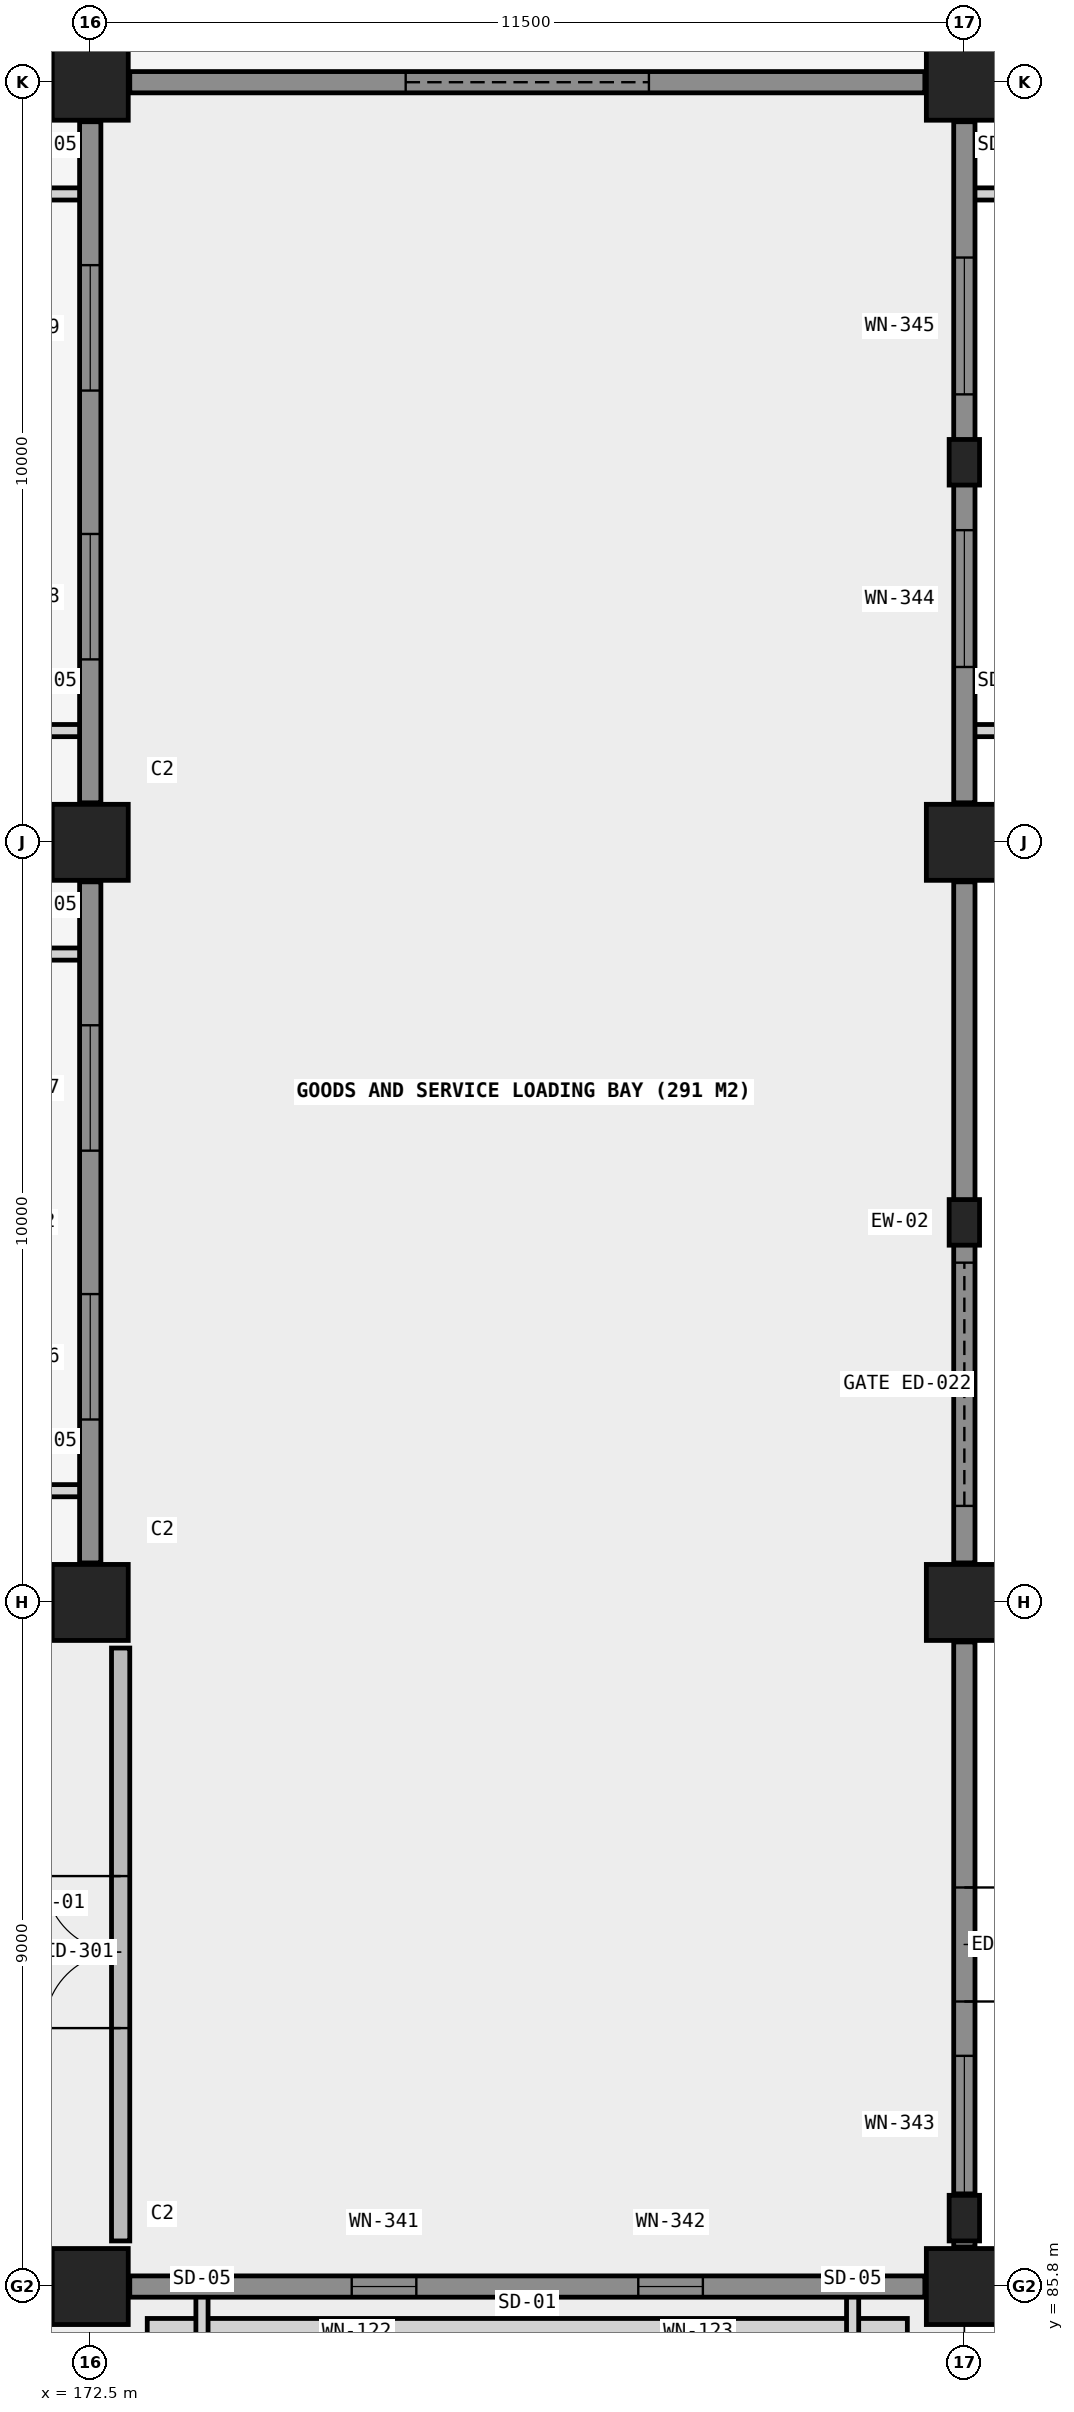
"""IFC4 building model, lengths in metres.
Left out: names, types, materials, properties, quantities, classifications, styles, units other than length and angle.
Written with IfcOpenShell. Run it as: python <this file> out.ifc"""

import sys

from ifc_helpers import new_model, si_unit, direction, frame, frame_2d, origin, origin_2d, place, context, subcontext, project, spatial, rectangle, extrude, element, fill, save


model = new_model("IFC4")
c1 = context("Model", 3, precision=1e-05, world=origin(), true_north=direction((0.0, 1.0)))
c2 = subcontext(c1, "Body", "Model", "MODEL_VIEW")
j1 = project(units=[si_unit("LENGTHUNIT", "METRE"), si_unit("PLANEANGLEUNIT", "RADIAN")], contexts=[c1])
p1 = place(None, origin())
s1 = spatial("IfcSite", under=j1, at=p1, CompositionType="ELEMENT")
p2 = place(p1, origin())
s2 = spatial("IfcBuilding", under=s1, at=p2, CompositionType="ELEMENT")
p3 = place(p2, origin())
s3 = spatial("IfcBuildingStorey", under=s2, at=p3, CompositionType="ELEMENT", Elevation=0.0)
for number, where, z_axis, x_axis in (
    (1, (172.5, 85.8, 0.0), (0.0, 0.0, 1.0), (1.0, 0.0, 0.0)),
    (2, (172.5, 94.8, 0.0), (0.0, 0.0, 1.0), (1.0, 0.0, 0.0)),
    (3, (172.5, 104.8, 0.0), (0.0, 0.0, 1.0), (1.0, 0.0, 0.0)),
    (4, (172.5, 114.8, 0.0), (0.0, 0.0, 1.0), (1.0, 0.0, 0.0)),
    (5, (184.0, 85.8, 0.0), (0.0, 0.0, 1.0), (1.0, 0.0, 0.0)),
    (6, (184.0, 94.8, 0.0), (0.0, 0.0, 1.0), (1.0, 0.0, 0.0)),
    (7, (184.0, 104.8, 0.0), (0.0, 0.0, 1.0), (1.0, 0.0, 0.0)),
    (8, (184.0, 114.8, 0.0), (0.0, 0.0, 1.0), (1.0, 0.0, 0.0)),
):
    element("IfcColumn", number, at=place(p3, frame(where, z_axis=z_axis, x_axis=x_axis)), inside=s3, PredefinedType="COLUMN", context=c2, shape_type="SweptSolid", body=[
        extrude(rectangle(XDim=1.0, YDim=1.0, at=origin_2d()), origin(), (0.0, 0.0, 1.0), 4.2),
    ])
for number, where, z_axis, x_axis in (
    (9, (184.0, 86.7, 0.0), (0.0, 0.0, 1.0), (1.0, 0.0, 0.0)),
    (10, (184.0, 99.8, 0.0), (0.0, 0.0, 1.0), (1.0, 0.0, 0.0)),
    (11, (184.0, 109.8, 0.0), (0.0, 0.0, 1.0), (1.0, 0.0, 0.0)),
):
    element("IfcColumn", number, at=place(p3, frame(where, z_axis=z_axis, x_axis=x_axis)), inside=s3, PredefinedType="PILASTER", context=c2, shape_type="SweptSolid", body=[
        extrude(rectangle(XDim=0.4, YDim=0.6, at=origin_2d()), origin(), (0.0, 0.0, 1.0), 4.2),
    ])
p4 = place(p3, frame((173.02, 85.8, 0.0), z_axis=(0.0, 0.0, 1.0), x_axis=(1.0, 0.0, 0.0)))
e12 = element("IfcWall", 12, at=p4, inside=s3, PredefinedType="SOLIDWALL", context=c2, shape_type="SweptSolid", body=[
    extrude(rectangle(XDim=10.46, YDim=0.28, at=frame_2d((5.23, 0.0))), origin(), (0.0, 0.0, 1.0), 3.15),
])
p5 = place(p4, frame((2.92, 0.0, 1.25)))
e13 = element("IfcOpeningElement", 13, at=p5, cuts=e12, PredefinedType="OPENING", context=c2, shape_type="SweptSolid", body=[
    extrude(rectangle(XDim=0.85, YDim=0.95, at=frame_2d((0.425, 0.475))), frame((0.0, 0.15, 0.0), z_axis=(0.0, -1.0, 0.0), x_axis=(1.0, 0.0, 0.0)), (0.0, 0.0, 1.0), 0.3),
])
p6 = place(p4, frame((6.69, 0.0, 1.25)))
e14 = element("IfcOpeningElement", 14, at=p6, cuts=e12, PredefinedType="OPENING", context=c2, shape_type="SweptSolid", body=[
    extrude(rectangle(XDim=0.85, YDim=0.95, at=frame_2d((0.425, 0.475))), frame((0.0, 0.15, 0.0), z_axis=(0.0, -1.0, 0.0), x_axis=(1.0, 0.0, 0.0)), (0.0, 0.0, 1.0), 0.3),
])
p7 = place(p3, frame((184.0, 86.32, 0.0), z_axis=(0.0, 0.0, 1.0), x_axis=(0.0, 1.0, 0.0)))
e15 = element("IfcWall", 15, at=p7, inside=s3, PredefinedType="SOLIDWALL", context=c2, shape_type="SweptSolid", body=[
    extrude(rectangle(XDim=7.96, YDim=0.28, at=frame_2d((3.98, 0.0))), origin(), (0.0, 0.0, 1.0), 3.25),
])
p8 = place(p7, frame((3.23, 0.0, 0.0)))
e16 = element("IfcOpeningElement", 16, at=p8, cuts=e15, PredefinedType="OPENING", context=c2, shape_type="SweptSolid", body=[
    extrude(rectangle(XDim=1.5, YDim=2.3, at=frame_2d((0.75, 1.15))), frame((0.0, 0.15, 0.0), z_axis=(0.0, -1.0, 0.0), x_axis=(1.0, 0.0, 0.0)), (0.0, 0.0, 1.0), 0.3),
])
p9 = place(p7, frame((0.715, 0.0, 0.78)))
e17 = element("IfcOpeningElement", 17, at=p9, cuts=e15, PredefinedType="OPENING", context=c2, shape_type="SweptSolid", body=[
    extrude(rectangle(XDim=1.8, YDim=1.3, at=frame_2d((0.9, 0.65))), frame((0.0, 0.15, 0.0), z_axis=(0.0, -1.0, 0.0), x_axis=(1.0, 0.0, 0.0)), (0.0, 0.0, 1.0), 0.3),
])
p10 = place(p3, frame((184.0, 95.32, 0.0), z_axis=(0.0, 0.0, 1.0), x_axis=(0.0, 1.0, 0.0)))
e18 = element("IfcWall", 18, at=p10, inside=s3, PredefinedType="SOLIDWALL", context=c2, shape_type="SweptSolid", body=[
    extrude(rectangle(XDim=8.96, YDim=0.28, at=frame_2d((4.48, 0.0))), origin(), (0.0, 0.0, 1.0), 3.25),
])
p11 = place(p10, frame((0.75, 0.0, 0.0)))
e19 = element("IfcOpeningElement", 19, at=p11, cuts=e18, PredefinedType="OPENING", context=c2, shape_type="SweptSolid", body=[
    extrude(rectangle(XDim=3.2, YDim=3.05, at=frame_2d((1.6, 1.525))), frame((0.0, 0.15, 0.0), z_axis=(0.0, -1.0, 0.0), x_axis=(1.0, 0.0, 0.0)), (0.0, 0.0, 1.0), 0.3),
])
p12 = place(p3, frame((184.0, 105.32, 0.0), z_axis=(0.0, 0.0, 1.0), x_axis=(0.0, 1.0, 0.0)))
e20 = element("IfcWall", 20, at=p12, inside=s3, PredefinedType="SOLIDWALL", context=c2, shape_type="SweptSolid", body=[
    extrude(rectangle(XDim=8.96, YDim=0.28, at=frame_2d((4.48, 0.0))), origin(), (0.0, 0.0, 1.0), 3.25),
])
p13 = place(p12, frame((1.787, 0.0, 1.25)))
e21 = element("IfcOpeningElement", 21, at=p13, cuts=e20, PredefinedType="OPENING", context=c2, shape_type="SweptSolid", body=[
    extrude(rectangle(XDim=1.8, YDim=1.3, at=frame_2d((0.9, 0.65))), frame((0.0, 0.15, 0.0), z_axis=(0.0, -1.0, 0.0), x_axis=(1.0, 0.0, 0.0)), (0.0, 0.0, 1.0), 0.3),
])
p14 = place(p12, frame((5.373, 0.0, 1.25)))
e22 = element("IfcOpeningElement", 22, at=p14, cuts=e20, PredefinedType="OPENING", context=c2, shape_type="SweptSolid", body=[
    extrude(rectangle(XDim=1.8, YDim=1.3, at=frame_2d((0.9, 0.65))), frame((0.0, 0.15, 0.0), z_axis=(0.0, -1.0, 0.0), x_axis=(1.0, 0.0, 0.0)), (0.0, 0.0, 1.0), 0.3),
])
p15 = place(p3, frame((173.02, 114.8, 0.0), z_axis=(0.0, 0.0, 1.0), x_axis=(1.0, 0.0, 0.0)))
e23 = element("IfcWall", 23, at=p15, inside=s3, PredefinedType="SOLIDWALL", context=c2, shape_type="SweptSolid", body=[
    extrude(rectangle(XDim=10.46, YDim=0.28, at=frame_2d((5.23, 0.0))), origin(), (0.0, 0.0, 1.0), 3.15),
])
p16 = place(p15, frame((3.63, 0.0, 0.0)))
e24 = element("IfcOpeningElement", 24, at=p16, cuts=e23, PredefinedType="OPENING", context=c2, shape_type="SweptSolid", body=[
    extrude(rectangle(XDim=3.2, YDim=3.05, at=frame_2d((1.6, 1.525))), frame((0.0, 0.15, 0.0), z_axis=(0.0, -1.0, 0.0), x_axis=(1.0, 0.0, 0.0)), (0.0, 0.0, 1.0), 0.3),
])
p17 = place(p3, frame((172.5, 95.32, 0.0), z_axis=(0.0, 0.0, 1.0), x_axis=(0.0, 1.0, 0.0)))
e25 = element("IfcWall", 25, at=p17, inside=s3, PredefinedType="SOLIDWALL", context=c2, shape_type="SweptSolid", body=[
    extrude(rectangle(XDim=8.96, YDim=0.28, at=frame_2d((4.48, 0.0))), origin(), (0.0, 0.0, 1.0), 3.15),
])
p18 = place(p17, frame((1.887, 0.0, 0.85)))
e26 = element("IfcOpeningElement", 26, at=p18, cuts=e25, PredefinedType="OPENING", context=c2, shape_type="SweptSolid", body=[
    extrude(rectangle(XDim=1.65, YDim=1.9, at=frame_2d((0.825, 0.95))), frame((0.0, 0.15, 0.0), z_axis=(0.0, -1.0, 0.0), x_axis=(1.0, 0.0, 0.0)), (0.0, 0.0, 1.0), 0.3),
])
p19 = place(p17, frame((5.423, 0.0, 0.85)))
e27 = element("IfcOpeningElement", 27, at=p19, cuts=e25, PredefinedType="OPENING", context=c2, shape_type="SweptSolid", body=[
    extrude(rectangle(XDim=1.65, YDim=1.9, at=frame_2d((0.825, 0.95))), frame((0.0, 0.15, 0.0), z_axis=(0.0, -1.0, 0.0), x_axis=(1.0, 0.0, 0.0)), (0.0, 0.0, 1.0), 0.3),
])
p20 = place(p3, frame((172.5, 105.32, 0.0), z_axis=(0.0, 0.0, 1.0), x_axis=(0.0, 1.0, 0.0)))
e28 = element("IfcWall", 28, at=p20, inside=s3, PredefinedType="SOLIDWALL", context=c2, shape_type="SweptSolid", body=[
    extrude(rectangle(XDim=8.96, YDim=0.28, at=frame_2d((4.48, 0.0))), origin(), (0.0, 0.0, 1.0), 3.15),
])
p21 = place(p20, frame((1.887, 0.0, 0.85)))
e29 = element("IfcOpeningElement", 29, at=p21, cuts=e28, PredefinedType="OPENING", context=c2, shape_type="SweptSolid", body=[
    extrude(rectangle(XDim=1.65, YDim=1.9, at=frame_2d((0.825, 0.95))), frame((0.0, 0.15, 0.0), z_axis=(0.0, -1.0, 0.0), x_axis=(1.0, 0.0, 0.0)), (0.0, 0.0, 1.0), 0.3),
])
p22 = place(p20, frame((5.423, 0.0, 0.85)))
e30 = element("IfcOpeningElement", 30, at=p22, cuts=e28, PredefinedType="OPENING", context=c2, shape_type="SweptSolid", body=[
    extrude(rectangle(XDim=1.65, YDim=1.9, at=frame_2d((0.825, 0.95))), frame((0.0, 0.15, 0.0), z_axis=(0.0, -1.0, 0.0), x_axis=(1.0, 0.0, 0.0)), (0.0, 0.0, 1.0), 0.3),
])
p23 = place(p3, frame((172.9, 86.4, 0.0), z_axis=(0.0, 0.0, 1.0), x_axis=(0.0, 1.0, 0.0)))
e31 = element("IfcWall", 31, at=p23, inside=s3, PredefinedType="SOLIDWALL", context=c2, shape_type="SweptSolid", body=[
    extrude(rectangle(XDim=7.8, YDim=0.24, at=frame_2d((3.9, 0.0))), origin(), (0.0, 0.0, 1.0), 3.88),
])
p24 = place(p23, frame((2.8, 0.0, 0.0)))
e32 = element("IfcOpeningElement", 32, at=p24, cuts=e31, PredefinedType="OPENING", context=c2, shape_type="SweptSolid", body=[
    extrude(rectangle(XDim=2.0, YDim=2.3, at=frame_2d((1.0, 1.15))), frame((0.0, 0.13, 0.0), z_axis=(0.0, -1.0, 0.0), x_axis=(1.0, 0.0, 0.0)), (0.0, 0.0, 1.0), 0.26),
])
p25 = place(p5, origin())
e33 = element("IfcWindow", 33, at=p25, inside=s3, PartitioningType="SINGLE_PANEL", PredefinedType="WINDOW", context=c2, shape_type="SweptSolid", body=[
    extrude(rectangle(XDim=0.85, YDim=0.95, at=frame_2d((0.425, 0.475))), frame((0.0, 0.03, 0.0), z_axis=(0.0, -1.0, 0.0), x_axis=(1.0, 0.0, 0.0)), (0.0, 0.0, 1.0), 0.06),
])
fill(e13, e33)
p26 = place(p6, origin())
e34 = element("IfcWindow", 34, at=p26, inside=s3, PartitioningType="SINGLE_PANEL", PredefinedType="WINDOW", context=c2, shape_type="SweptSolid", body=[
    extrude(rectangle(XDim=0.85, YDim=0.95, at=frame_2d((0.425, 0.475))), frame((0.0, 0.03, 0.0), z_axis=(0.0, -1.0, 0.0), x_axis=(1.0, 0.0, 0.0)), (0.0, 0.0, 1.0), 0.06),
])
fill(e14, e34)
p27 = place(p8, frame((0.75, 0.0, 0.0), z_axis=(0.0, 0.0, 1.0), x_axis=(-1.0, 0.0, 0.0)))
e35 = element("IfcDoor", 35, at=p27, inside=s3, OperationType="DOUBLE_DOOR_SINGLE_SWING", PredefinedType="DOOR", context=c2, shape_type="SweptSolid", body=[
    extrude(rectangle(XDim=1.5, YDim=2.3, at=frame_2d((0.0, 1.15))), frame((0.0, 0.025, 0.0), z_axis=(0.0, -1.0, 0.0), x_axis=(1.0, 0.0, 0.0)), (0.0, 0.0, 1.0), 0.05),
])
fill(e16, e35)
p28 = place(p9, origin())
e36 = element("IfcWindow", 36, at=p28, inside=s3, PartitioningType="SINGLE_PANEL", PredefinedType="WINDOW", context=c2, shape_type="SweptSolid", body=[
    extrude(rectangle(XDim=1.8, YDim=1.3, at=frame_2d((0.9, 0.65))), frame((0.0, 0.03, 0.0), z_axis=(0.0, -1.0, 0.0), x_axis=(1.0, 0.0, 0.0)), (0.0, 0.0, 1.0), 0.06),
])
fill(e17, e36)
p29 = place(p11, origin())
e37 = element("IfcDoor", 37, at=p29, inside=s3, OperationType="ROLLINGUP", PredefinedType="GATE", context=c2, shape_type="SweptSolid", body=[
    extrude(rectangle(XDim=3.2, YDim=3.05, at=frame_2d((1.6, 1.525))), frame((0.0, 0.025, 0.0), z_axis=(0.0, -1.0, 0.0), x_axis=(1.0, 0.0, 0.0)), (0.0, 0.0, 1.0), 0.05),
])
fill(e19, e37)
p30 = place(p13, origin())
e38 = element("IfcWindow", 38, at=p30, inside=s3, PartitioningType="SINGLE_PANEL", PredefinedType="WINDOW", context=c2, shape_type="SweptSolid", body=[
    extrude(rectangle(XDim=1.8, YDim=1.3, at=frame_2d((0.9, 0.65))), frame((0.0, 0.03, 0.0), z_axis=(0.0, -1.0, 0.0), x_axis=(1.0, 0.0, 0.0)), (0.0, 0.0, 1.0), 0.06),
])
fill(e21, e38)
p31 = place(p14, origin())
e39 = element("IfcWindow", 39, at=p31, inside=s3, PartitioningType="SINGLE_PANEL", PredefinedType="WINDOW", context=c2, shape_type="SweptSolid", body=[
    extrude(rectangle(XDim=1.8, YDim=1.3, at=frame_2d((0.9, 0.65))), frame((0.0, 0.03, 0.0), z_axis=(0.0, -1.0, 0.0), x_axis=(1.0, 0.0, 0.0)), (0.0, 0.0, 1.0), 0.06),
])
fill(e22, e39)
p32 = place(p16, origin())
e40 = element("IfcDoor", 40, at=p32, inside=s3, OperationType="ROLLINGUP", PredefinedType="GATE", context=c2, shape_type="SweptSolid", body=[
    extrude(rectangle(XDim=3.2, YDim=3.05, at=frame_2d((1.6, 1.525))), frame((0.0, 0.025, 0.0), z_axis=(0.0, -1.0, 0.0), x_axis=(1.0, 0.0, 0.0)), (0.0, 0.0, 1.0), 0.05),
])
fill(e24, e40)
p33 = place(p18, origin())
e41 = element("IfcWindow", 41, at=p33, inside=s3, PartitioningType="SINGLE_PANEL", PredefinedType="WINDOW", context=c2, shape_type="SweptSolid", body=[
    extrude(rectangle(XDim=1.65, YDim=1.9, at=frame_2d((0.825, 0.95))), frame((0.0, 0.03, 0.0), z_axis=(0.0, -1.0, 0.0), x_axis=(1.0, 0.0, 0.0)), (0.0, 0.0, 1.0), 0.06),
])
fill(e26, e41)
p34 = place(p19, origin())
e42 = element("IfcWindow", 42, at=p34, inside=s3, PartitioningType="SINGLE_PANEL", PredefinedType="WINDOW", context=c2, shape_type="SweptSolid", body=[
    extrude(rectangle(XDim=1.65, YDim=1.9, at=frame_2d((0.825, 0.95))), frame((0.0, 0.03, 0.0), z_axis=(0.0, -1.0, 0.0), x_axis=(1.0, 0.0, 0.0)), (0.0, 0.0, 1.0), 0.06),
])
fill(e27, e42)
p35 = place(p21, origin())
e43 = element("IfcWindow", 43, at=p35, inside=s3, PartitioningType="SINGLE_PANEL", PredefinedType="WINDOW", context=c2, shape_type="SweptSolid", body=[
    extrude(rectangle(XDim=1.65, YDim=1.9, at=frame_2d((0.825, 0.95))), frame((0.0, 0.03, 0.0), z_axis=(0.0, -1.0, 0.0), x_axis=(1.0, 0.0, 0.0)), (0.0, 0.0, 1.0), 0.06),
])
fill(e29, e43)
p36 = place(p22, origin())
e44 = element("IfcWindow", 44, at=p36, inside=s3, PartitioningType="SINGLE_PANEL", PredefinedType="WINDOW", context=c2, shape_type="SweptSolid", body=[
    extrude(rectangle(XDim=1.65, YDim=1.9, at=frame_2d((0.825, 0.95))), frame((0.0, 0.03, 0.0), z_axis=(0.0, -1.0, 0.0), x_axis=(1.0, 0.0, 0.0)), (0.0, 0.0, 1.0), 0.06),
])
fill(e30, e44)
p37 = place(p24, origin())
e45 = element("IfcDoor", 45, at=p37, inside=s3, OperationType="DOUBLE_DOOR_SINGLE_SWING", PredefinedType="DOOR", context=c2, shape_type="SweptSolid", body=[
    extrude(rectangle(XDim=2.0, YDim=2.3, at=frame_2d((1.0, 1.15))), frame((0.0, 0.025, 0.0), z_axis=(0.0, -1.0, 0.0), x_axis=(1.0, 0.0, 0.0)), (0.0, 0.0, 1.0), 0.05),
])
fill(e32, e45)
save(model, sys.argv[1])
